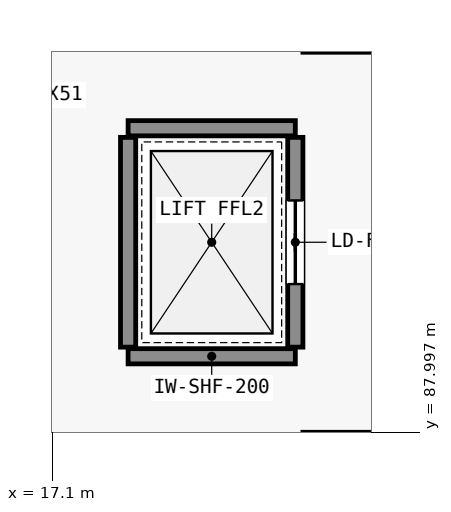
"""IFC4 building model, lengths in metres.
Left out: names, types, materials, properties, quantities, classifications, styles, units other than length and angle.
Written with IfcOpenShell. Run it as: python <this file> out.ifc"""

import sys

from ifc_helpers import new_model, si_unit, direction, frame, frame_2d, origin, place, context, subcontext, project, spatial, rectangle, extrude, element, fill, save


model = new_model("IFC4")
c1 = context("Model", 3, precision=1e-05, world=origin(), true_north=direction((0.0, 1.0)))
c2 = subcontext(c1, "Body", "Model", "MODEL_VIEW")
j1 = project(units=[si_unit("LENGTHUNIT", "METRE"), si_unit("PLANEANGLEUNIT", "RADIAN")], contexts=[c1])
p1 = place(None, origin())
s1 = spatial("IfcSite", under=j1, at=p1, CompositionType="ELEMENT")
p2 = place(p1, origin())
s2 = spatial("IfcBuilding", under=s1, at=p2, CompositionType="ELEMENT")
p3 = place(p2, frame((0.0, 0.0, 21.0)))
s3 = spatial("IfcBuildingStorey", under=s2, at=p3, CompositionType="ELEMENT", Elevation=21.0)
for number, where, z_axis, x_axis in (
    (1, (18.1, 89.0, 0.0), (0.0, 0.0, 1.0), (1.0, 0.0, 0.0)),
    (2, (18.1, 92.0, 0.0), (0.0, 0.0, 1.0), (1.0, 0.0, 0.0)),
):
    element("IfcWall", number, at=place(p3, frame(where, z_axis=z_axis, x_axis=x_axis)), inside=s3, PredefinedType="STANDARD", context=c2, shape_type="SweptSolid", body=[
        extrude(rectangle(XDim=2.2, YDim=0.2, at=frame_2d((1.1, 0.0))), origin(), (0.0, 0.0, 1.0), 5.06),
    ])
p4 = place(p3, frame((18.1, 89.12, 0.0), z_axis=(0.0, 0.0, 1.0), x_axis=(0.0, 1.0, 0.0)))
e3 = element("IfcWall", 3, at=p4, inside=s3, PredefinedType="STANDARD", context=c2, shape_type="SweptSolid", body=[
    extrude(rectangle(XDim=2.76, YDim=0.2, at=frame_2d((1.38, 0.0))), origin(), (0.0, 0.0, 1.0), 5.06),
])
p5 = place(p3, frame((20.3, 89.12, 0.0), z_axis=(0.0, 0.0, 1.0), x_axis=(0.0, 1.0, 0.0)))
e4 = element("IfcWall", 4, at=p5, inside=s3, PredefinedType="STANDARD", context=c2, shape_type="SweptSolid", body=[
    extrude(rectangle(XDim=2.76, YDim=0.2, at=frame_2d((1.38, 0.0))), origin(), (0.0, 0.0, 1.0), 5.06),
])
p6 = place(p5, frame((0.83, 0.0, 0.0)))
e5 = element("IfcOpeningElement", 5, at=p6, cuts=e4, PredefinedType="OPENING", context=c2, shape_type="SweptSolid", body=[
    extrude(rectangle(XDim=1.1, YDim=2.15, at=frame_2d((0.55, 1.075))), frame((0.0, 0.11, 0.0), z_axis=(0.0, -1.0, 0.0), x_axis=(1.0, 0.0, 0.0)), (0.0, 0.0, 1.0), 0.22),
])
p7 = place(p6, origin())
e6 = element("IfcDoor", 6, at=p7, inside=s3, OperationType="SLIDING_TO_LEFT", PredefinedType="DOOR", context=c2, shape_type="SweptSolid", body=[
    extrude(rectangle(XDim=1.1, YDim=2.15, at=frame_2d((0.55, 1.075))), frame((0.0, 0.025, 0.0), z_axis=(0.0, -1.0, 0.0), x_axis=(1.0, 0.0, 0.0)), (0.0, 0.0, 1.0), 0.05),
])
fill(e5, e6)
save(model, sys.argv[1])
